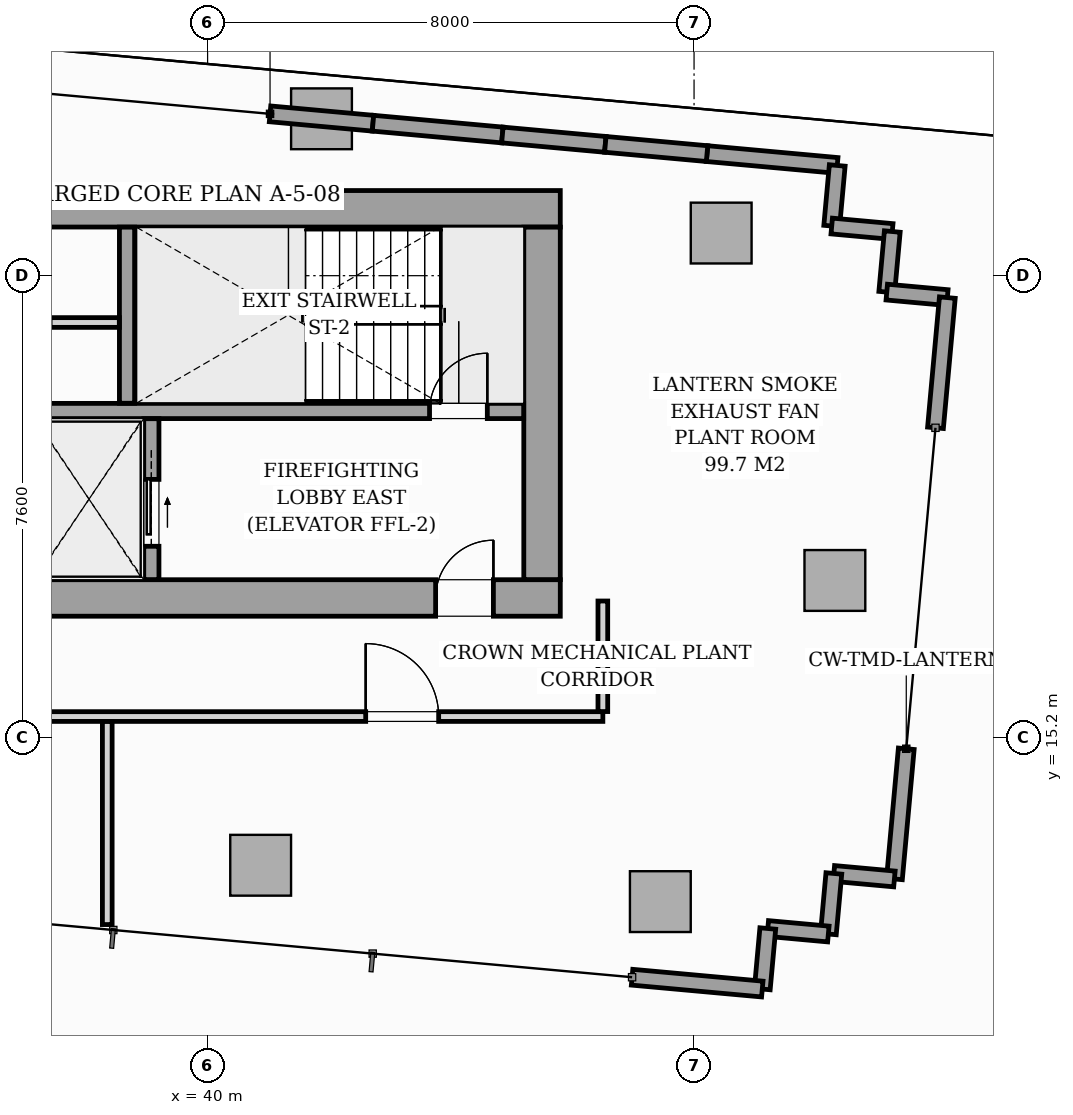
"""IFC4 building model, lengths in metres.
Left out: names, types, materials, properties, quantities, classifications, styles, units other than length and angle.
Written with IfcOpenShell. Run it as: python <this file> out.ifc"""

import sys

from ifc_helpers import new_model, si_unit, direction, frame, frame_2d, origin, origin_2d, place, context, subcontext, project, spatial, rectangle, i_section, extrude, source, transform, mapped, element, fill, save


model = new_model("IFC4")
c1 = context("Model", 3, precision=1e-05, world=origin(), true_north=direction((0.0, 1.0)))
c2 = subcontext(c1, "Body", "Model", "MODEL_VIEW")
j1 = project(units=[si_unit("LENGTHUNIT", "METRE"), si_unit("PLANEANGLEUNIT", "RADIAN")], contexts=[c1])
p1 = place(None, origin())
s1 = spatial("IfcSite", under=j1, at=p1, CompositionType="ELEMENT")
p2 = place(p1, origin())
s2 = spatial("IfcBuilding", under=s1, at=p2, CompositionType="ELEMENT")
p3 = place(p2, frame((0.0, 0.0, 264.3)))
s3 = spatial("IfcBuildingStorey", under=s2, at=p3, CompositionType="ELEMENT", Elevation=264.3)
m1 = source(origin(), c2, "Body", "SweptSolid", [
    extrude(i_section(OverallWidth=0.404, OverallDepth=0.407, WebThickness=0.027, FlangeThickness=0.044, FilletRadius=0.018, at=origin_2d()), origin(), (0.0, 0.0, 1.0), 6.496),
])
for number, where, z_axis, x_axis in (
    (1, (38.88, 17.4, 0.002), (0.0, 0.0, 1.0), (1.0, 0.0, 0.0)),
    (2, (45.6, 17.4, 0.002), (0.0, 0.0, 1.0), (1.0, 0.0, 0.0)),
    (3, (38.88, 24.0, 0.002), (0.0, 0.0, 1.0), (1.0, 0.0, 0.0)),
    (4, (45.6, 24.0, 0.002), (0.0, 0.0, 1.0), (1.0, 0.0, 0.0)),
):
    element("IfcColumn", number, at=place(p3, frame(where, z_axis=z_axis, x_axis=x_axis)), inside=s3, PredefinedType="PILASTER", context=c2, shape_type="MappedRepresentation", body=[
        mapped(m1, transform((0.0, 0.0, 0.0), scale=1.0)),
    ])
m2 = source(origin(), c2, "Body", "SweptSolid", [
    extrude(rectangle(XDim=1.0, YDim=1.0, at=origin_2d()), origin(), (0.0, 0.0, 1.0), 6.494),
])
for number, where, z_axis, x_axis in (
    (5, (40.873, 13.104, 0.004), (0.0, 0.0, 1.0), (0.996, -0.091, 0.0)),
    (6, (47.445, 12.506, 0.004), (0.0, 0.0, 1.0), (0.996, -0.091, 0.0)),
    (7, (41.873, 25.38, 0.004), (0.0, 0.0, 1.0), (0.996, -0.091, 0.0)),
    (8, (48.446, 23.501, 0.004), (0.0, 0.0, 1.0), (0.996, -0.091, 0.0)),
    (9, (50.316, 17.788, 0.004), (0.0, 0.0, 1.0), (0.996, -0.091, 0.0)),
):
    element("IfcColumn", number, at=place(p3, frame(where, z_axis=z_axis, x_axis=x_axis)), inside=s3, PredefinedType="COLUMN", context=c2, shape_type="MappedRepresentation", body=[
        mapped(m2, transform((0.0, 0.0, 0.0), scale=1.0)),
    ])
p4 = place(p3, frame((48.213, 24.807, 0.0), z_axis=(0.0, 0.0, 1.0), x_axis=(0.995885756807, -0.090617654952, 0.0)))
e10 = element("IfcWall", 10, at=p4, inside=s3, PredefinedType="STANDARD", context=c2, shape_type="SweptSolid", body=[
    extrude(rectangle(XDim=2.15, YDim=0.26, at=frame_2d((1.075, 0.0))), origin(), (0.0, 0.0, 1.0), 6.2),
])
p5 = place(p3, frame((41.027, 25.461, 0.0), z_axis=(0.0, 0.0, 1.0), x_axis=(0.995897914147, -0.090483946627, 0.0)))
e11 = element("IfcWall", 11, at=p5, inside=s3, PredefinedType="STANDARD", context=c2, shape_type="SweptSolid", body=[
    extrude(rectangle(XDim=1.7, YDim=0.26, at=frame_2d((0.85, 0.0))), origin(), (0.0, 0.0, 1.0), 6.2),
])
p6 = place(p3, frame((42.72, 25.307, 0.0), z_axis=(0.0, 0.0, 1.0), x_axis=(0.995876331405, -0.090721180259, 0.0)))
e12 = element("IfcWall", 12, at=p6, inside=s3, PredefinedType="STANDARD", context=c2, shape_type="SweptSolid", body=[
    extrude(rectangle(XDim=2.137, YDim=0.26, at=frame_2d((1.068, 0.0))), origin(), (0.0, 0.0, 1.0), 6.2),
])
p7 = place(p3, frame((44.848, 25.114, 0.0), z_axis=(0.0, 0.0, 1.0), x_axis=(0.995884961653, -0.090626393251, 0.0)))
e13 = element("IfcWall", 13, at=p7, inside=s3, PredefinedType="STANDARD", context=c2, shape_type="SweptSolid", body=[
    extrude(rectangle(XDim=1.7, YDim=0.26, at=frame_2d((0.85, 0.0))), origin(), (0.0, 0.0, 1.0), 6.2),
])
p8 = place(p3, frame((46.541, 24.959, 0.0), z_axis=(0.0, 0.0, 1.0), x_axis=(0.995890823101, -0.090561959246, 0.0)))
e14 = element("IfcWall", 14, at=p8, inside=s3, PredefinedType="STANDARD", context=c2, shape_type="SweptSolid", body=[
    extrude(rectangle(XDim=1.679, YDim=0.26, at=frame_2d((0.84, 0.0))), origin(), (0.0, 0.0, 1.0), 6.2),
])
for number, where, z_axis, x_axis in (
    (15, (50.354, 24.613, 0.0), (0.0, 0.0, 1.0), (-0.091, -0.996, 0.0)),
    (16, (50.264, 23.617, 0.0), (0.0, 0.0, 1.0), (0.996, -0.091, 0.0)),
    (17, (51.26, 23.526, 0.0), (0.0, 0.0, 1.0), (-0.091, -0.996, 0.0)),
    (18, (51.169, 22.53, 0.0), (0.0, 0.0, 1.0), (0.996, -0.091, 0.0)),
):
    element("IfcWall", number, at=place(p3, frame(where, z_axis=z_axis, x_axis=x_axis)), inside=s3, PredefinedType="STANDARD", context=c2, shape_type="SweptSolid", body=[
        extrude(rectangle(XDim=1.0, YDim=0.26, at=frame_2d((0.5, 0.0))), origin(), (0.0, 0.0, 1.0), 6.2),
    ])
p9 = place(p3, frame((52.165, 22.439, 0.0), z_axis=(0.0, 0.0, 1.0), x_axis=(-0.090617654952, -0.995885756807, 0.0)))
e19 = element("IfcWall", 19, at=p9, inside=s3, PredefinedType="STANDARD", context=c2, shape_type="SweptSolid", body=[
    extrude(rectangle(XDim=2.15, YDim=0.26, at=frame_2d((1.075, 0.0))), origin(), (0.0, 0.0, 1.0), 6.2),
])
p10 = place(p3, frame((51.49, 15.02, 0.0), z_axis=(0.0, 0.0, 1.0), x_axis=(-0.090720017492, -0.995876437329, 0.0)))
e20 = element("IfcWall", 20, at=p10, inside=s3, PredefinedType="STANDARD", context=c2, shape_type="SweptSolid", body=[
    extrude(rectangle(XDim=2.15, YDim=0.26, at=frame_2d((1.075, 0.0))), origin(), (0.0, 0.0, 1.0), 6.2),
])
for number, where, z_axis, x_axis in (
    (21, (51.295, 12.879, 0.0), (0.0, 0.0, 1.0), (-0.996, 0.091, 0.0)),
    (22, (50.299, 12.969, 0.0), (0.0, 0.0, 1.0), (-0.091, -0.996, 0.0)),
    (23, (50.208, 11.974, 0.0), (0.0, 0.0, 1.0), (-0.996, 0.091, 0.0)),
    (24, (49.213, 12.064, 0.0), (0.0, 0.0, 1.0), (-0.091, -0.996, 0.0)),
):
    element("IfcWall", number, at=place(p3, frame(where, z_axis=z_axis, x_axis=x_axis)), inside=s3, PredefinedType="STANDARD", context=c2, shape_type="SweptSolid", body=[
        extrude(rectangle(XDim=1.0, YDim=0.26, at=frame_2d((0.5, 0.0))), origin(), (0.0, 0.0, 1.0), 6.2),
    ])
p11 = place(p3, frame((49.122, 11.069, 0.0), z_axis=(0.0, 0.0, 1.0), x_axis=(-0.99588668912, 0.090607408268, 0.0)))
e25 = element("IfcWall", 25, at=p11, inside=s3, PredefinedType="STANDARD", context=c2, shape_type="SweptSolid", body=[
    extrude(rectangle(XDim=2.15, YDim=0.26, at=frame_2d((1.075, 0.0))), origin(), (0.0, 0.0, 1.0), 6.2),
])
p12 = place(p3, frame((26.2, 17.5, 0.0), z_axis=(0.0, 0.0, 1.0), x_axis=(1.0, 0.0, 0.0)))
e26 = element("IfcWall", 26, at=p12, inside=s3, PredefinedType="SHEAR", context=c2, shape_type="SweptSolid", body=[
    extrude(rectangle(XDim=19.6, YDim=0.6, at=frame_2d((9.8, 0.0))), origin(), (0.0, 0.0, 1.0), 6.5),
])
p13 = place(p12, frame((0.95, 0.0, 0.0)))
e27 = element("IfcOpeningElement", 27, at=p13, cuts=e26, PredefinedType="OPENING", context=c2, shape_type="SweptSolid", body=[
    extrude(rectangle(XDim=0.95, YDim=2.06, at=frame_2d((0.475, 1.03))), frame((0.0, 0.31, 0.0), z_axis=(0.0, -1.0, 0.0), x_axis=(1.0, 0.0, 0.0)), (0.0, 0.0, 1.0), 0.62),
])
p14 = place(p12, frame((9.38, 0.0, 0.0)))
e28 = element("IfcOpeningElement", 28, at=p14, cuts=e26, PredefinedType="OPENING", context=c2, shape_type="SweptSolid", body=[
    extrude(rectangle(XDim=0.9, YDim=2.06, at=frame_2d((0.45, 1.03))), frame((0.0, 0.31, 0.0), z_axis=(0.0, -1.0, 0.0), x_axis=(1.0, 0.0, 0.0)), (0.0, 0.0, 1.0), 0.62),
])
p15 = place(p12, frame((17.55, 0.0, 0.0)))
e29 = element("IfcOpeningElement", 29, at=p15, cuts=e26, PredefinedType="OPENING", context=c2, shape_type="SweptSolid", body=[
    extrude(rectangle(XDim=0.95, YDim=2.06, at=frame_2d((0.475, 1.03))), frame((0.0, 0.31, 0.0), z_axis=(0.0, -1.0, 0.0), x_axis=(1.0, 0.0, 0.0)), (0.0, 0.0, 1.0), 0.62),
])
p16 = place(p3, frame((26.2, 23.9, 0.0), z_axis=(0.0, 0.0, 1.0), x_axis=(1.0, 0.0, 0.0)))
e30 = element("IfcWall", 30, at=p16, inside=s3, PredefinedType="SHEAR", context=c2, shape_type="SweptSolid", body=[
    extrude(rectangle(XDim=19.6, YDim=0.6, at=frame_2d((9.8, 0.0))), origin(), (0.0, 0.0, 1.0), 6.5),
])
p17 = place(p3, frame((45.5, 17.802, 0.0), z_axis=(0.0, 0.0, 1.0), x_axis=(0.0, 1.0, 0.0)))
e31 = element("IfcWall", 31, at=p17, inside=s3, PredefinedType="SHEAR", context=c2, shape_type="SweptSolid", body=[
    extrude(rectangle(XDim=5.796, YDim=0.6, at=frame_2d((2.898, 0.0))), origin(), (0.0, 0.0, 1.0), 6.5),
])
p18 = place(p3, frame((37.05, 20.575, 0.0), z_axis=(0.0, 0.0, 1.0), x_axis=(1.0, 0.0, 0.0)))
e32 = element("IfcWall", 32, at=p18, inside=s3, PredefinedType="SOLIDWALL", context=c2, shape_type="SweptSolid", body=[
    extrude(rectangle(XDim=8.148, YDim=0.25, at=frame_2d((4.074, 0.0))), origin(), (0.0, 0.0, 1.0), 6.5),
])
p19 = place(p18, frame((6.6, 0.0, 0.0)))
e33 = element("IfcOpeningElement", 33, at=p19, cuts=e32, PredefinedType="OPENING", context=c2, shape_type="SweptSolid", body=[
    extrude(rectangle(XDim=0.95, YDim=2.06, at=frame_2d((0.475, 1.03))), frame((0.0, 0.135, 0.0), z_axis=(0.0, -1.0, 0.0), x_axis=(1.0, 0.0, 0.0)), (0.0, 0.0, 1.0), 0.27),
])
p20 = place(p3, frame((38.675, 20.702, 0.0), z_axis=(0.0, 0.0, 1.0), x_axis=(0.0, 1.0, 0.0)))
e34 = element("IfcWall", 34, at=p20, inside=s3, PredefinedType="SOLIDWALL", context=c2, shape_type="SweptSolid", body=[
    extrude(rectangle(XDim=2.896, YDim=0.25, at=frame_2d((1.448, 0.0))), origin(), (0.0, 0.0, 1.0), 6.5),
])
p21 = place(p3, frame((39.075, 17.802, 0.0), z_axis=(0.0, 0.0, 1.0), x_axis=(0.0, 1.0, 0.0)))
e35 = element("IfcWall", 35, at=p21, inside=s3, PredefinedType="SOLIDWALL", context=c2, shape_type="SweptSolid", body=[
    extrude(rectangle(XDim=2.646, YDim=0.25, at=frame_2d((1.323, 0.0))), origin(), (0.0, 0.0, 1.0), 6.5),
])
p22 = place(p21, frame((0.548, 0.0, 0.0)))
e36 = element("IfcOpeningElement", 36, at=p22, cuts=e35, PredefinedType="OPENING", context=c2, shape_type="SweptSolid", body=[
    extrude(rectangle(XDim=1.1, YDim=2.08, at=frame_2d((0.55, 1.04))), frame((0.0, 0.135, 0.0), z_axis=(0.0, -1.0, 0.0), x_axis=(1.0, 0.0, 0.0)), (0.0, 0.0, 1.0), 0.27),
])
p23 = place(p3, frame((33.452, 22.03, 0.0), z_axis=(0.0, 0.0, 1.0), x_axis=(1.0, 0.0, 0.0)))
e37 = element("IfcWall", 37, at=p23, inside=s3, PredefinedType="PARTITIONING", context=c2, shape_type="SweptSolid", body=[
    extrude(rectangle(XDim=5.096, YDim=0.16, at=frame_2d((2.548, 0.0))), origin(), (0.0, 0.0, 1.0), 6.2),
])
p24 = place(p23, frame((0.538, 0.0, 0.0)))
e38 = element("IfcOpeningElement", 38, at=p24, cuts=e37, PredefinedType="OPENING", context=c2, shape_type="SweptSolid", body=[
    extrude(rectangle(XDim=0.8, YDim=2.05, at=frame_2d((0.4, 1.025))), frame((0.0, 0.09, 0.0), z_axis=(0.0, -1.0, 0.0), x_axis=(1.0, 0.0, 0.0)), (0.0, 0.0, 1.0), 0.18),
])
p25 = place(p23, frame((3.158, 0.0, 0.0)))
e39 = element("IfcOpeningElement", 39, at=p25, cuts=e37, PredefinedType="OPENING", context=c2, shape_type="SweptSolid", body=[
    extrude(rectangle(XDim=0.8, YDim=2.05, at=frame_2d((0.4, 1.025))), frame((0.0, 0.09, 0.0), z_axis=(0.0, -1.0, 0.0), x_axis=(1.0, 0.0, 0.0)), (0.0, 0.0, 1.0), 0.18),
])
p26 = place(p3, frame((25.5, 15.55, 0.0), z_axis=(0.0, 0.0, 1.0), x_axis=(1.0, 0.0, 0.0)))
e40 = element("IfcWall", 40, at=p26, inside=s3, PredefinedType="PARTITIONING", context=c2, shape_type="SweptSolid", body=[
    extrude(rectangle(XDim=21.0, YDim=0.16, at=frame_2d((10.5, 0.0))), origin(), (0.0, 0.0, 1.0), 5.756),
])
p27 = place(p26, frame((3.12, 0.0, 0.0)))
e41 = element("IfcOpeningElement", 41, at=p27, cuts=e40, PredefinedType="OPENING", context=c2, shape_type="SweptSolid", body=[
    extrude(rectangle(XDim=0.55, YDim=2.02, at=frame_2d((0.275, 1.01))), frame((0.0, 0.09, 0.0), z_axis=(0.0, -1.0, 0.0), x_axis=(1.0, 0.0, 0.0)), (0.0, 0.0, 1.0), 0.18),
])
p28 = place(p26, frame((5.45, 0.0, 0.0)))
e42 = element("IfcOpeningElement", 42, at=p28, cuts=e40, PredefinedType="OPENING", context=c2, shape_type="SweptSolid", body=[
    extrude(rectangle(XDim=1.2, YDim=2.08, at=frame_2d((0.6, 1.04))), frame((0.0, 0.09, 0.0), z_axis=(0.0, -1.0, 0.0), x_axis=(1.0, 0.0, 0.0)), (0.0, 0.0, 1.0), 0.18),
])
p29 = place(p26, frame((17.1, 0.0, 0.0)))
e43 = element("IfcOpeningElement", 43, at=p29, cuts=e40, PredefinedType="OPENING", context=c2, shape_type="SweptSolid", body=[
    extrude(rectangle(XDim=1.2, YDim=2.08, at=frame_2d((0.6, 1.04))), frame((0.0, 0.09, 0.0), z_axis=(0.0, -1.0, 0.0), x_axis=(1.0, 0.0, 0.0)), (0.0, 0.0, 1.0), 0.18),
])
p30 = place(p3, frame((46.5, 15.632, 0.0), z_axis=(0.0, 0.0, 1.0), x_axis=(0.0, 1.0, 0.0)))
e44 = element("IfcWall", 44, at=p30, inside=s3, PredefinedType="PARTITIONING", context=c2, shape_type="SweptSolid", body=[
    extrude(rectangle(XDim=1.818, YDim=0.16, at=frame_2d((0.909, 0.0))), origin(), (0.0, 0.0, 1.0), 6.2),
])
p31 = place(p3, frame((38.35, 12.129, 0.0), z_axis=(0.0, 0.0, 1.0), x_axis=(0.0, 1.0, 0.0)))
e45 = element("IfcWall", 45, at=p31, inside=s3, PredefinedType="PARTITIONING", context=c2, shape_type="SweptSolid", body=[
    extrude(rectangle(XDim=3.339, YDim=0.16, at=frame_2d((1.669, 0.0))), origin(), (0.0, 0.0, 1.0), 6.2),
])
m3 = source(origin(), c2, "Body", "SweptSolid", [
    extrude(rectangle(XDim=0.95, YDim=2.06, at=frame_2d((0.475, 1.03))), frame((0.0, 0.025, 0.0), z_axis=(0.0, -1.0, 0.0), x_axis=(1.0, 0.0, 0.0)), (0.0, 0.0, 1.0), 0.05),
])
p32 = place(p15, origin())
e46 = element("IfcDoor", 46, at=p32, inside=s3, OperationType="SINGLE_SWING_RIGHT", PredefinedType="DOOR", context=c2, shape_type="MappedRepresentation", body=[
    mapped(m3, transform((0.0, 0.0, 0.0), scale=1.0)),
])
fill(e29, e46)
p33 = place(p19, origin())
e47 = element("IfcDoor", 47, at=p33, inside=s3, OperationType="SINGLE_SWING_RIGHT", PredefinedType="DOOR", context=c2, shape_type="MappedRepresentation", body=[
    mapped(m3, transform((0.0, 0.0, 0.0), scale=1.0)),
])
fill(e33, e47)
m4 = source(origin(), c2, "Body", "SweptSolid", [
    extrude(rectangle(XDim=1.1, YDim=2.08, at=frame_2d((0.55, 1.04))), frame((0.0, 0.025, 0.0), z_axis=(0.0, -1.0, 0.0), x_axis=(1.0, 0.0, 0.0)), (0.0, 0.0, 1.0), 0.05),
])
p34 = place(p22, origin())
e48 = element("IfcDoor", 48, at=p34, inside=s3, OperationType="SLIDING_TO_RIGHT", PredefinedType="DOOR", context=c2, shape_type="MappedRepresentation", body=[
    mapped(m4, transform((0.0, 0.0, 0.0), scale=1.0)),
])
fill(e36, e48)
m5 = source(origin(), c2, "Body", "SweptSolid", [
    extrude(rectangle(XDim=1.2, YDim=2.08, at=frame_2d((0.6, 1.04))), frame((0.0, 0.025, 0.0), z_axis=(0.0, -1.0, 0.0), x_axis=(1.0, 0.0, 0.0)), (0.0, 0.0, 1.0), 0.05),
])
p35 = place(p29, origin())
e49 = element("IfcDoor", 49, at=p35, inside=s3, OperationType="SINGLE_SWING_LEFT", PredefinedType="DOOR", context=c2, shape_type="MappedRepresentation", body=[
    mapped(m5, transform((0.0, 0.0, 0.0), scale=1.0)),
])
fill(e43, e49)
save(model, sys.argv[1])
